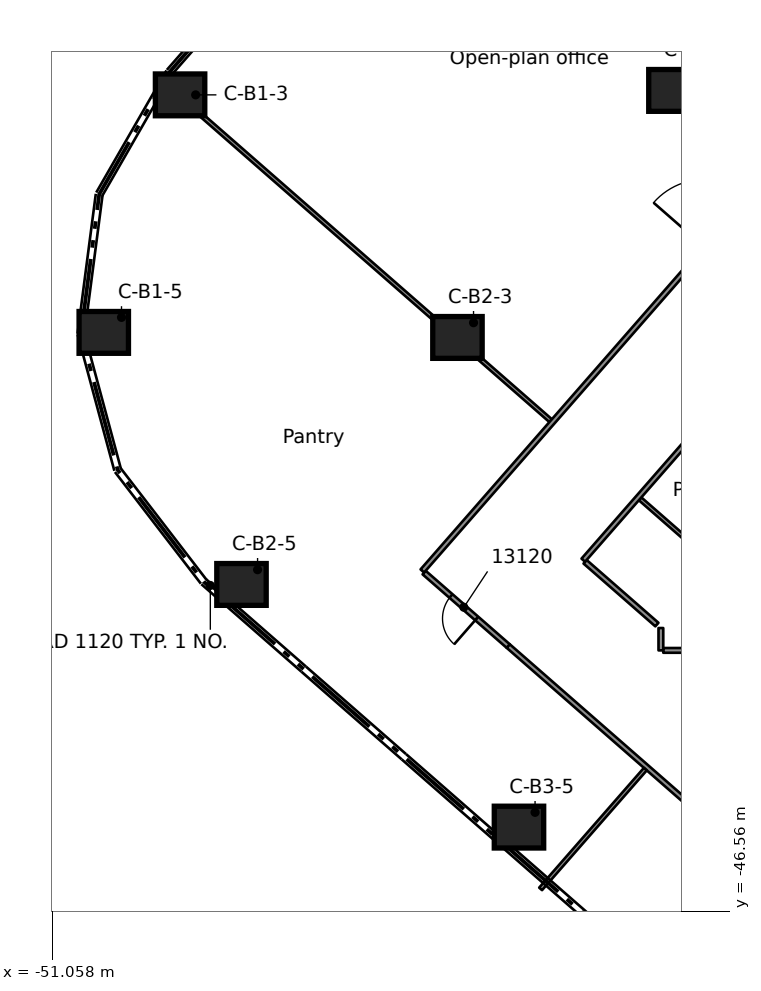
"""IFC4 building model, lengths in metres.
Left out: names, types, materials, properties, quantities, classifications, styles, units other than length and angle.
Written with IfcOpenShell. Run it as: python <this file> out.ifc"""

import sys

from ifc_helpers import new_model, si_unit, direction, frame, frame_2d, origin, origin_2d, place, context, subcontext, project, spatial, rectangle, extrude, element, fill, save


model = new_model("IFC4")
c1 = context("Model", 3, precision=1e-05, world=origin(), true_north=direction((0.0, 1.0)))
c2 = subcontext(c1, "Body", "Model", "MODEL_VIEW")
j1 = project(units=[si_unit("LENGTHUNIT", "METRE"), si_unit("PLANEANGLEUNIT", "RADIAN")], contexts=[c1])
p1 = place(None, origin())
s1 = spatial("IfcSite", under=j1, at=p1, CompositionType="ELEMENT")
p2 = place(p1, origin())
s2 = spatial("IfcBuilding", under=s1, at=p2, CompositionType="ELEMENT")
p3 = place(p2, frame((0.0, 0.0, 62.3)))
s3 = spatial("IfcBuildingStorey", under=s2, at=p3, CompositionType="ELEMENT", Elevation=62.3)
for number, where, z_axis, x_axis in (
    (1, (-47.689, -25.073, 0.0), (0.0, 0.0, 1.0), (1.0, 0.0, 0.0)),
    (2, (-49.697, -31.323, 0.0), (0.0, 0.0, 1.0), (1.0, 0.0, 0.0)),
    (3, (-34.707, -24.956, 0.0), (0.0, 0.0, 1.0), (1.0, 0.0, 0.0)),
    (4, (-40.39, -31.456, 0.0), (0.0, 0.0, 1.0), (1.0, 0.0, 0.0)),
    (5, (-46.073, -37.955, 0.0), (0.0, 0.0, 1.0), (1.0, 0.0, 0.0)),
    (6, (-38.771, -44.34, 0.0), (0.0, 0.0, 1.0), (1.0, 0.0, 0.0)),
):
    element("IfcColumn", number, at=place(p3, frame(where, z_axis=z_axis, x_axis=x_axis)), inside=s3, PredefinedType="COLUMN", context=c2, shape_type="SweptSolid", body=[
        extrude(rectangle(XDim=1.3, YDim=1.1, at=origin_2d()), origin(), (0.0, 0.0, 1.0), 3.5),
    ])
p4 = place(p3, frame((-31.798, -45.921, 0.0), z_axis=(0.0, 0.0, 1.0), x_axis=(-0.752771196542, 0.658282253792, 0.0)))
e7 = element("IfcWall", 7, at=p4, inside=s3, PredefinedType="PARTITIONING", context=c2, shape_type="SweptSolid", body=[
    extrude(rectangle(XDim=9.64, YDim=0.125, at=frame_2d((4.82, 0.0))), origin(), (0.0, 0.0, 1.0), 3.08),
])
p5 = place(p4, frame((2.04, 0.0, 0.0)))
e8 = element("IfcOpeningElement", 8, at=p5, cuts=e7, PredefinedType="OPENING", context=c2, shape_type="SweptSolid", body=[
    extrude(rectangle(XDim=0.9, YDim=2.1, at=frame_2d((0.45, 1.05))), frame((0.0, 0.073, 0.0), z_axis=(0.0, -1.0, 0.0), x_axis=(1.0, 0.0, 0.0)), (0.0, 0.0, 1.0), 0.145),
])
p6 = place(p3, frame((-37.032, -37.358, 0.0), z_axis=(0.0, 0.0, 1.0), x_axis=(0.752691127314, -0.658373804812, 0.0)))
e9 = element("IfcWall", 9, at=p6, inside=s3, PredefinedType="PARTITIONING", context=c2, shape_type="SweptSolid", body=[
    extrude(rectangle(XDim=2.511, YDim=0.125, at=frame_2d((1.255, 0.0))), origin(), (0.0, 0.0, 1.0), 3.08),
])
p7 = place(p3, frame((-48.313, -24.572, 0.0), z_axis=(0.0, 0.0, 1.0), x_axis=(0.75276101301, -0.658293898872, 0.0)))
e10 = element("IfcWall", 10, at=p7, inside=s3, PredefinedType="PARTITIONING", context=c2, shape_type="SweptSolid", body=[
    extrude(rectangle(XDim=13.783, YDim=0.1, at=frame_2d((6.891, 0.0))), origin(), (0.0, 0.0, 1.0), 3.08),
])
p8 = place(p3, frame((-35.584, -35.702, 0.0), z_axis=(0.0, 0.0, 1.0), x_axis=(0.75268021229, -0.658386283292, 0.0)))
e11 = element("IfcWall", 11, at=p8, inside=s3, PredefinedType="PARTITIONING", context=c2, shape_type="SweptSolid", body=[
    extrude(rectangle(XDim=6.574, YDim=0.1, at=frame_2d((3.287, 0.0))), origin(), (0.0, 0.0, 1.0), 3.08),
])
p9 = place(p3, frame((-39.055, -39.575, 0.0), z_axis=(0.0, 0.0, 1.0), x_axis=(-0.753045000135, 0.657969017334, 0.0)))
e12 = element("IfcWall", 12, at=p9, inside=s3, PredefinedType="PARTITIONING", context=c2, shape_type="SweptSolid", body=[
    extrude(rectangle(XDim=2.938, YDim=0.125, at=frame_2d((1.469, 0.0))), origin(), (0.0, 0.0, 1.0), 3.08),
])
p10 = place(p9, frame((1.1, 0.0, 0.0)))
e13 = element("IfcOpeningElement", 13, at=p10, cuts=e12, PredefinedType="OPENING", context=c2, shape_type="SweptSolid", body=[
    extrude(rectangle(XDim=0.9, YDim=2.1, at=frame_2d((0.45, 1.05))), frame((0.0, 0.073, 0.0), z_axis=(0.0, -1.0, 0.0), x_axis=(1.0, 0.0, 0.0)), (0.0, 0.0, 1.0), 0.145),
])
p11 = place(p3, frame((-34.974, -39.69, 0.0), z_axis=(0.0, 0.0, 1.0), x_axis=(1.0, 0.0, 0.0)))
e14 = element("IfcWall", 14, at=p11, inside=s3, PredefinedType="PARTITIONING", context=c2, shape_type="SweptSolid", body=[
    extrude(rectangle(XDim=0.609, YDim=0.125, at=frame_2d((0.305, 0.0))), origin(), (0.0, 0.0, 1.0), 3.08),
])
p12 = place(p3, frame((-38.202, -45.966, 0.0), z_axis=(0.0, 0.0, 1.0), x_axis=(0.658203200775, 0.752840319384, 0.0)))
e15 = element("IfcWall", 15, at=p12, inside=s3, PredefinedType="PARTITIONING", context=c2, shape_type="SweptSolid", body=[
    extrude(rectangle(XDim=4.187, YDim=0.1, at=frame_2d((2.094, 0.0))), origin(), (0.0, 0.0, 1.0), 3.08),
])
p13 = place(p3, frame((-22.736, -20.913, 0.0), z_axis=(0.0, 0.0, 1.0), x_axis=(-0.658236458127, -0.752811241409, 0.0)))
e16 = element("IfcWall", 16, at=p13, inside=s3, PredefinedType="PARTITIONING", context=c2, shape_type="SweptSolid", body=[
    extrude(rectangle(XDim=21.79, YDim=0.125, at=frame_2d((10.895, 0.0))), origin(), (0.0, 0.0, 1.0), 3.08),
])
p14 = place(p13, frame((2.35, 0.0, 0.0)))
e17 = element("IfcOpeningElement", 17, at=p14, cuts=e16, PredefinedType="OPENING", context=c2, shape_type="SweptSolid", body=[
    extrude(rectangle(XDim=0.9, YDim=2.1, at=frame_2d((0.45, 1.05))), frame((0.0, 0.073, 0.0), z_axis=(0.0, -1.0, 0.0), x_axis=(1.0, 0.0, 0.0)), (0.0, 0.0, 1.0), 0.145),
])
p15 = place(p3, frame((-41.314, -37.6, 0.0), z_axis=(0.0, 0.0, 1.0), x_axis=(0.658340906106, 0.752719902319, 0.0)))
e18 = element("IfcWall", 18, at=p15, inside=s3, PredefinedType="PARTITIONING", context=c2, shape_type="SweptSolid", body=[
    extrude(rectangle(XDim=24.075, YDim=0.125, at=frame_2d((12.038, 0.0))), origin(), (0.0, 0.0, 1.0), 3.08),
])
p16 = place(p15, frame((21.051, 0.0, 0.0)))
e19 = element("IfcOpeningElement", 19, at=p16, cuts=e18, PredefinedType="OPENING", context=c2, shape_type="SweptSolid", body=[
    extrude(rectangle(XDim=1.1, YDim=2.1, at=frame_2d((0.55, 1.05))), frame((0.0, 0.073, 0.0), z_axis=(0.0, -1.0, 0.0), x_axis=(1.0, 0.0, 0.0)), (0.0, 0.0, 1.0), 0.145),
])
p17 = place(p15, frame((11.3, 0.0, 0.0)))
e20 = element("IfcOpeningElement", 20, at=p17, cuts=e18, PredefinedType="OPENING", context=c2, shape_type="SweptSolid", body=[
    extrude(rectangle(XDim=1.8, YDim=2.1, at=frame_2d((0.9, 1.05))), frame((0.0, 0.073, 0.0), z_axis=(0.0, -1.0, 0.0), x_axis=(1.0, 0.0, 0.0)), (0.0, 0.0, 1.0), 0.145),
])
p18 = place(p3, frame((-35.037, -39.69, 0.0), z_axis=(0.0, 0.0, 1.0), x_axis=(0.0, 1.0, 0.0)))
e21 = element("IfcWall", 21, at=p18, inside=s3, PredefinedType="PARTITIONING", context=c2, shape_type="SweptSolid", body=[
    extrude(rectangle(XDim=0.588, YDim=0.125, at=frame_2d((0.294, 0.0))), origin(), (0.0, 0.0, 1.0), 3.08),
])
p19 = place(p10, origin())
e22 = element("IfcDoor", 22, at=p19, inside=s3, OperationType="SINGLE_SWING_RIGHT", PredefinedType="DOOR", context=c2, shape_type="SweptSolid", body=[
    extrude(rectangle(XDim=0.9, YDim=2.1, at=frame_2d((0.45, 1.05))), frame((0.0, 0.025, 0.0), z_axis=(0.0, -1.0, 0.0), x_axis=(1.0, 0.0, 0.0)), (0.0, 0.0, 1.0), 0.05),
])
fill(e13, e22)
save(model, sys.argv[1])
